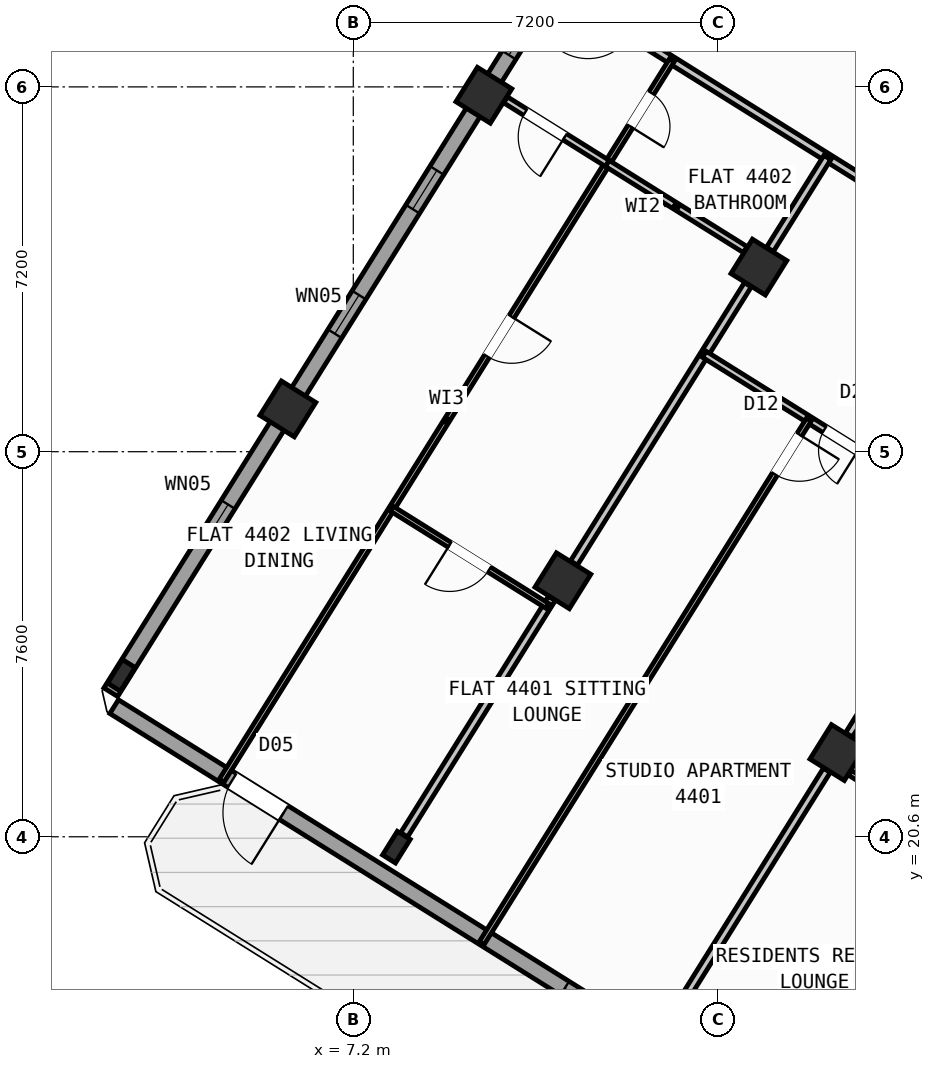
"""IFC4 building model, lengths in metres.
Left out: names, types, materials, properties, quantities, classifications, styles, units other than length and angle.
Written with IfcOpenShell. Run it as: python <this file> out.ifc"""

import sys

from ifc_helpers import new_model, si_unit, direction, frame, frame_2d, origin, origin_2d, place, context, subcontext, project, spatial, rectangle, hollow_rectangle, i_section, extrude, source, transform, mapped, element, fill, save


model = new_model("IFC4")
c1 = context("Model", 3, precision=1e-05, world=origin(), true_north=direction((0.0, 1.0)))
c2 = subcontext(c1, "Body", "Model", "MODEL_VIEW")
j1 = project(units=[si_unit("LENGTHUNIT", "METRE"), si_unit("PLANEANGLEUNIT", "RADIAN")], contexts=[c1])
p1 = place(None, origin())
s1 = spatial("IfcSite", under=j1, at=p1, CompositionType="ELEMENT")
p2 = place(p1, origin())
s2 = spatial("IfcBuilding", under=s1, at=p2, CompositionType="ELEMENT")
p3 = place(p2, frame((0.0, 0.0, 174.9)))
s3 = spatial("IfcBuildingStorey", under=s2, at=p3, CompositionType="ELEMENT", Elevation=174.9)
m1 = source(origin(), c2, "Body", "SweptSolid", [
    extrude(hollow_rectangle(XDim=0.8, YDim=0.8, WallThickness=0.032, at=origin_2d()), origin(), (0.0, 0.0, 1.0), 4.5),
])
for number, where, z_axis, x_axis in (
    (1, (16.764, 22.261, 0.0), (0.0, 0.0, 1.0), (-0.848, 0.53, 0.0)),
    (2, (15.205, 31.844, 0.0), (0.0, 0.0, 1.0), (-0.848, 0.53, 0.0)),
    (3, (11.336, 25.653, 0.0), (0.0, 0.0, 1.0), (-0.848, 0.53, 0.0)),
):
    element("IfcColumn", number, at=place(p3, frame(where, z_axis=z_axis, x_axis=x_axis)), inside=s3, PredefinedType="COLUMN", context=c2, shape_type="MappedRepresentation", body=[
        mapped(m1, transform((0.0, 0.0, 0.0), scale=1.0)),
    ])
m2 = source(origin(), c2, "Body", "SweptSolid", [
    extrude(i_section(OverallWidth=0.3, OverallDepth=0.55, WebThickness=0.015, FlangeThickness=0.029, at=origin_2d()), origin(), (0.0, 0.0, 1.0), 4.5),
])
p4 = place(p3, frame((8.051, 20.395, 0.0), z_axis=(0.0, 0.0, 1.0), x_axis=(-0.848048096156, 0.529919264233, 0.0)))
e4 = element("IfcColumn", 4, at=p4, inside=s3, PredefinedType="COLUMN", context=c2, shape_type="MappedRepresentation", body=[
    mapped(m2, transform((0.0, 0.0, 0.0), scale=1.0)),
])
for number, where, z_axis, x_axis in (
    (5, (9.777, 35.235, 0.0), (0.0, 0.0, 1.0), (-0.848, 0.53, 0.0)),
    (6, (5.909, 29.044, 0.0), (0.0, 0.0, 1.0), (-0.848, 0.53, 0.0)),
):
    element("IfcColumn", number, at=place(p3, frame(where, z_axis=z_axis, x_axis=x_axis)), inside=s3, PredefinedType="COLUMN", context=c2, shape_type="MappedRepresentation", body=[
        mapped(m1, transform((0.0, 0.0, 0.0), scale=1.0)),
    ])
p5 = place(p3, frame((2.623, 23.786, 0.0), z_axis=(0.0, 0.0, 1.0), x_axis=(-0.848048096156, 0.529919264233, 0.0)))
e7 = element("IfcColumn", 7, at=p5, inside=s3, PredefinedType="COLUMN", context=c2, shape_type="MappedRepresentation", body=[
    mapped(m2, transform((0.0, 0.0, 0.0), scale=1.0)),
])
p6 = place(p3, frame((29.268, 6.429, 0.0), z_axis=(0.0, 0.0, 1.0), x_axis=(-0.848049971435, 0.529916263149, 0.0)))
e8 = element("IfcWall", 8, at=p6, inside=s3, PredefinedType="STANDARD", context=c2, shape_type="SweptSolid", body=[
    extrude(rectangle(XDim=31.588, YDim=0.32, at=frame_2d((15.794, 0.0))), origin(), (0.0, 0.0, 1.0), 4.22),
])
p7 = place(p6, frame((27.641, 0.0, 0.0)))
e9 = element("IfcOpeningElement", 9, at=p7, cuts=e8, PredefinedType="OPENING", context=c2, shape_type="SweptSolid", body=[
    extrude(rectangle(XDim=1.2, YDim=2.15, at=frame_2d((0.6, 1.075))), frame((0.0, 0.17, 0.0), z_axis=(0.0, -1.0, 0.0), x_axis=(1.0, 0.0, 0.0)), (0.0, 0.0, 1.0), 0.34),
])
p8 = place(p6, frame((2.954, 0.0, 0.8)))
e10 = element("IfcOpeningElement", 10, at=p8, cuts=e8, PredefinedType="OPENING", context=c2, shape_type="SweptSolid", body=[
    extrude(rectangle(XDim=2.1, YDim=1.55, at=frame_2d((1.05, 0.775))), frame((0.0, 0.17, 0.0), z_axis=(0.0, -1.0, 0.0), x_axis=(1.0, 0.0, 0.0)), (0.0, 0.0, 1.0), 0.34),
])
p9 = place(p6, frame((8.253, 0.0, 0.8)))
e11 = element("IfcOpeningElement", 11, at=p9, cuts=e8, PredefinedType="OPENING", context=c2, shape_type="SweptSolid", body=[
    extrude(rectangle(XDim=2.1, YDim=1.55, at=frame_2d((1.05, 0.775))), frame((0.0, 0.17, 0.0), z_axis=(0.0, -1.0, 0.0), x_axis=(1.0, 0.0, 0.0)), (0.0, 0.0, 1.0), 0.34),
])
p10 = place(p6, frame((20.2, 0.0, 1.0)))
e12 = element("IfcOpeningElement", 12, at=p10, cuts=e8, PredefinedType="OPENING", context=c2, shape_type="SweptSolid", body=[
    extrude(rectangle(XDim=0.9, YDim=1.25, at=frame_2d((0.45, 0.625))), frame((0.0, 0.17, 0.0), z_axis=(0.0, -1.0, 0.0), x_axis=(1.0, 0.0, 0.0)), (0.0, 0.0, 1.0), 0.34),
])
p11 = place(p3, frame((2.415, 23.452, 0.0), z_axis=(0.0, 0.0, 1.0), x_axis=(0.52991049553, 0.848053575387, 0.0)))
e13 = element("IfcWall", 13, at=p11, inside=s3, PredefinedType="STANDARD", context=c2, shape_type="SweptSolid", body=[
    extrude(rectangle(XDim=21.587, YDim=0.32, at=frame_2d((10.794, 0.0))), origin(), (0.0, 0.0, 1.0), 2.395),
])
p12 = place(p11, frame((3.469, 0.0, 1.0)))
e14 = element("IfcOpeningElement", 14, at=p12, cuts=e13, PredefinedType="OPENING", context=c2, shape_type="SweptSolid", body=[
    extrude(rectangle(XDim=0.9, YDim=1.25, at=frame_2d((0.45, 0.625))), frame((0.0, 0.17, 0.0), z_axis=(0.0, -1.0, 0.0), x_axis=(1.0, 0.0, 0.0)), (0.0, 0.0, 1.0), 0.34),
])
p13 = place(p11, frame((8.344, 0.0, 1.0)))
e15 = element("IfcOpeningElement", 15, at=p13, cuts=e13, PredefinedType="OPENING", context=c2, shape_type="SweptSolid", body=[
    extrude(rectangle(XDim=0.9, YDim=1.25, at=frame_2d((0.45, 0.625))), frame((0.0, 0.17, 0.0), z_axis=(0.0, -1.0, 0.0), x_axis=(1.0, 0.0, 0.0)), (0.0, 0.0, 1.0), 0.34),
])
p14 = place(p11, frame((11.244, 0.0, 1.0)))
e16 = element("IfcOpeningElement", 16, at=p14, cuts=e13, PredefinedType="OPENING", context=c2, shape_type="SweptSolid", body=[
    extrude(rectangle(XDim=0.9, YDim=1.25, at=frame_2d((0.45, 0.625))), frame((0.0, 0.17, 0.0), z_axis=(0.0, -1.0, 0.0), x_axis=(1.0, 0.0, 0.0)), (0.0, 0.0, 1.0), 0.34),
])
p15 = place(p11, frame((14.829, 0.0, 1.0)))
e17 = element("IfcOpeningElement", 17, at=p15, cuts=e13, PredefinedType="OPENING", context=c2, shape_type="SweptSolid", body=[
    extrude(rectangle(XDim=0.9, YDim=1.25, at=frame_2d((0.45, 0.625))), frame((0.0, 0.17, 0.0), z_axis=(0.0, -1.0, 0.0), x_axis=(1.0, 0.0, 0.0)), (0.0, 0.0, 1.0), 0.34),
])
p16 = place(p3, frame((14.138, 41.825, 0.0), z_axis=(0.0, 0.0, 1.0), x_axis=(0.848046498049, -0.529921821731, 0.0)))
e18 = element("IfcWall", 18, at=p16, inside=s3, PredefinedType="STANDARD", context=c2, shape_type="SweptSolid", body=[
    extrude(rectangle(XDim=31.588, YDim=0.32, at=frame_2d((15.794, 0.0))), origin(), (0.0, 0.0, 1.0), 4.22),
])
p17 = place(p16, frame((3.339, 0.0, 0.0)))
e19 = element("IfcOpeningElement", 19, at=p17, cuts=e18, PredefinedType="OPENING", context=c2, shape_type="SweptSolid", body=[
    extrude(rectangle(XDim=1.05, YDim=2.15, at=frame_2d((0.525, 1.075))), frame((0.0, 0.17, 0.0), z_axis=(0.0, -1.0, 0.0), x_axis=(1.0, 0.0, 0.0)), (0.0, 0.0, 1.0), 0.34),
])
p18 = place(p16, frame((1.819, 0.0, 1.0)))
e20 = element("IfcOpeningElement", 20, at=p18, cuts=e18, PredefinedType="OPENING", context=c2, shape_type="SweptSolid", body=[
    extrude(rectangle(XDim=0.9, YDim=1.25, at=frame_2d((0.45, 0.625))), frame((0.0, 0.17, 0.0), z_axis=(0.0, -1.0, 0.0), x_axis=(1.0, 0.0, 0.0)), (0.0, 0.0, 1.0), 0.34),
])
p19 = place(p16, frame((8.494, 0.0, 0.85)))
e21 = element("IfcOpeningElement", 21, at=p19, cuts=e18, PredefinedType="OPENING", context=c2, shape_type="SweptSolid", body=[
    extrude(rectangle(XDim=1.8, YDim=1.5, at=frame_2d((0.9, 0.75))), frame((0.0, 0.17, 0.0), z_axis=(0.0, -1.0, 0.0), x_axis=(1.0, 0.0, 0.0)), (0.0, 0.0, 1.0), 0.34),
])
p20 = place(p16, frame((14.636, 0.0, 1.0)))
e22 = element("IfcOpeningElement", 22, at=p20, cuts=e18, PredefinedType="OPENING", context=c2, shape_type="SweptSolid", body=[
    extrude(rectangle(XDim=0.9, YDim=1.25, at=frame_2d((0.45, 0.625))), frame((0.0, 0.17, 0.0), z_axis=(0.0, -1.0, 0.0), x_axis=(1.0, 0.0, 0.0)), (0.0, 0.0, 1.0), 0.34),
])
p21 = place(p16, frame((22.456, 0.0, 0.95)))
e23 = element("IfcOpeningElement", 23, at=p21, cuts=e18, PredefinedType="OPENING", context=c2, shape_type="SweptSolid", body=[
    extrude(rectangle(XDim=1.2, YDim=1.4, at=frame_2d((0.6, 0.7))), frame((0.0, 0.17, 0.0), z_axis=(0.0, -1.0, 0.0), x_axis=(1.0, 0.0, 0.0)), (0.0, 0.0, 1.0), 0.34),
])
p22 = place(p16, frame((27.131, 0.0, 0.95)))
e24 = element("IfcOpeningElement", 24, at=p22, cuts=e18, PredefinedType="OPENING", context=c2, shape_type="SweptSolid", body=[
    extrude(rectangle(XDim=1.2, YDim=1.4, at=frame_2d((0.6, 0.7))), frame((0.0, 0.17, 0.0), z_axis=(0.0, -1.0, 0.0), x_axis=(1.0, 0.0, 0.0)), (0.0, 0.0, 1.0), 0.34),
])
p23 = place(p3, frame((25.198, 28.606, 0.0), z_axis=(0.0, 0.0, 1.0), x_axis=(-0.529921796515, -0.848046513806, 0.0)))
e25 = element("IfcWall", 25, at=p23, inside=s3, PredefinedType="PARTITIONING", context=c2, shape_type="SweptSolid", body=[
    extrude(rectangle(XDim=16.5, YDim=0.16, at=frame_2d((8.25, 0.0))), origin(), (0.0, 0.0, 1.0), 4.21),
])
p24 = place(p3, frame((26.363, 30.472, 0.0), z_axis=(0.0, 0.0, 1.0), x_axis=(-0.848052408131, 0.529912363569, 0.0)))
e26 = element("IfcWall", 26, at=p24, inside=s3, PredefinedType="PARTITIONING", context=c2, shape_type="SweptSolid", body=[
    extrude(rectangle(XDim=16.73, YDim=0.16, at=frame_2d((8.365, 0.0))), origin(), (0.0, 0.0, 1.0), 4.21),
])
p25 = place(p24, frame((1.588, 0.0, 0.0)))
e27 = element("IfcOpeningElement", 27, at=p25, cuts=e26, PredefinedType="OPENING", context=c2, shape_type="SweptSolid", body=[
    extrude(rectangle(XDim=1.0, YDim=2.1, at=frame_2d((0.5, 1.05))), frame((0.0, 0.09, 0.0), z_axis=(0.0, -1.0, 0.0), x_axis=(1.0, 0.0, 0.0)), (0.0, 0.0, 1.0), 0.18),
])
p26 = place(p24, frame((6.685, 0.0, 0.0)))
e28 = element("IfcOpeningElement", 28, at=p26, cuts=e26, PredefinedType="OPENING", context=c2, shape_type="SweptSolid", body=[
    extrude(rectangle(XDim=1.0, YDim=2.1, at=frame_2d((0.5, 1.05))), frame((0.0, 0.09, 0.0), z_axis=(0.0, -1.0, 0.0), x_axis=(1.0, 0.0, 0.0)), (0.0, 0.0, 1.0), 0.18),
])
p27 = place(p24, frame((12.951, 0.0, 0.0)))
e29 = element("IfcOpeningElement", 29, at=p27, cuts=e26, PredefinedType="OPENING", context=c2, shape_type="SweptSolid", body=[
    extrude(rectangle(XDim=1.0, YDim=2.1, at=frame_2d((0.5, 1.05))), frame((0.0, 0.09, 0.0), z_axis=(0.0, -1.0, 0.0), x_axis=(1.0, 0.0, 0.0)), (0.0, 0.0, 1.0), 0.18),
])
p28 = place(p3, frame((25.198, 28.606, 0.0), z_axis=(0.0, 0.0, 1.0), x_axis=(-0.848052408131, 0.529912363569, 0.0)))
e30 = element("IfcWall", 30, at=p28, inside=s3, PredefinedType="PARTITIONING", context=c2, shape_type="SweptSolid", body=[
    extrude(rectangle(XDim=16.73, YDim=0.16, at=frame_2d((8.365, 0.0))), origin(), (0.0, 0.0, 1.0), 4.21),
])
p29 = place(p28, frame((1.395, 0.0, 0.0)))
e31 = element("IfcOpeningElement", 31, at=p29, cuts=e30, PredefinedType="OPENING", context=c2, shape_type="SweptSolid", body=[
    extrude(rectangle(XDim=1.0, YDim=2.1, at=frame_2d((0.5, 1.05))), frame((0.0, 0.09, 0.0), z_axis=(0.0, -1.0, 0.0), x_axis=(1.0, 0.0, 0.0)), (0.0, 0.0, 1.0), 0.18),
])
p30 = place(p28, frame((7.82, 0.0, 0.0)))
e32 = element("IfcOpeningElement", 32, at=p30, cuts=e30, PredefinedType="OPENING", context=c2, shape_type="SweptSolid", body=[
    extrude(rectangle(XDim=1.0, YDim=2.1, at=frame_2d((0.5, 1.05))), frame((0.0, 0.09, 0.0), z_axis=(0.0, -1.0, 0.0), x_axis=(1.0, 0.0, 0.0)), (0.0, 0.0, 1.0), 0.18),
])
p31 = place(p28, frame((14.76, 0.0, 0.0)))
e33 = element("IfcOpeningElement", 33, at=p31, cuts=e30, PredefinedType="OPENING", context=c2, shape_type="SweptSolid", body=[
    extrude(rectangle(XDim=1.0, YDim=2.1, at=frame_2d((0.5, 1.05))), frame((0.0, 0.09, 0.0), z_axis=(0.0, -1.0, 0.0), x_axis=(1.0, 0.0, 0.0)), (0.0, 0.0, 1.0), 0.18),
])
p32 = place(p3, frame((20.414, 28.103, 0.0), z_axis=(0.0, 0.0, 1.0), x_axis=(-0.529934553702, -0.848038542045, 0.0)))
e34 = element("IfcWall", 34, at=p32, inside=s3, PredefinedType="PARTITIONING", context=c2, shape_type="SweptSolid", body=[
    extrude(rectangle(XDim=6.476, YDim=0.16, at=frame_2d((3.238, 0.0))), origin(), (0.0, 0.0, 1.0), 2.395),
])
p33 = place(p3, frame((16.545, 21.912, 0.0), z_axis=(0.0, 0.0, 1.0), x_axis=(-0.52995106774, -0.848028222291, 0.0)))
e35 = element("IfcWall", 35, at=p33, inside=s3, PredefinedType="PARTITIONING", context=c2, shape_type="SweptSolid", body=[
    extrude(rectangle(XDim=5.501, YDim=0.16, at=frame_2d((2.75, 0.0))), origin(), (0.0, 0.0, 1.0), 4.21),
])
p34 = place(p3, frame((19.865, 20.073, 0.0), z_axis=(0.0, 0.0, 1.0), x_axis=(-0.848055143312, 0.529907986259, 0.0)))
e36 = element("IfcWall", 36, at=p34, inside=s3, PredefinedType="PARTITIONING", context=c2, shape_type="SweptSolid", body=[
    extrude(rectangle(XDim=3.378, YDim=0.11, at=frame_2d((1.689, 0.0))), origin(), (0.0, 0.0, 1.0), 2.395),
])
p35 = place(p34, frame((1.435, 0.0, 0.0)))
e37 = element("IfcOpeningElement", 37, at=p35, cuts=e36, PredefinedType="OPENING", context=c2, shape_type="SweptSolid", body=[
    extrude(rectangle(XDim=0.92, YDim=2.08, at=frame_2d((0.46, 1.04))), frame((0.0, 0.065, 0.0), z_axis=(0.0, -1.0, 0.0), x_axis=(1.0, 0.0, 0.0)), (0.0, 0.0, 1.0), 0.13),
])
p36 = place(p3, frame((16.556, 34.006, 0.0), z_axis=(0.0, 0.0, 1.0), x_axis=(-0.529927092104, -0.84804320471, 0.0)))
e38 = element("IfcWall", 38, at=p36, inside=s3, PredefinedType="PARTITIONING", context=c2, shape_type="SweptSolid", body=[
    extrude(rectangle(XDim=2.138, YDim=0.16, at=frame_2d((1.069, 0.0))), origin(), (0.0, 0.0, 1.0), 2.395),
])
p37 = place(p3, frame((14.986, 31.494, 0.0), z_axis=(0.0, 0.0, 1.0), x_axis=(-0.529907440938, -0.848055484057, 0.0)))
e39 = element("IfcWall", 39, at=p37, inside=s3, PredefinedType="PARTITIONING", context=c2, shape_type="SweptSolid", body=[
    extrude(rectangle(XDim=6.476, YDim=0.16, at=frame_2d((3.238, 0.0))), origin(), (0.0, 0.0, 1.0), 2.395),
])
p38 = place(p3, frame((11.118, 25.303, 0.0), z_axis=(0.0, 0.0, 1.0), x_axis=(-0.529919150083, -0.848048167486, 0.0)))
e40 = element("IfcWall", 40, at=p38, inside=s3, PredefinedType="PARTITIONING", context=c2, shape_type="SweptSolid", body=[
    extrude(rectangle(XDim=5.501, YDim=0.16, at=frame_2d((2.75, 0.0))), origin(), (0.0, 0.0, 1.0), 4.21),
])
p39 = place(p3, frame((19.556, 26.73, 0.0), z_axis=(0.0, 0.0, 1.0), x_axis=(-0.848049732085, 0.529916646191, 0.0)))
e41 = element("IfcWall", 41, at=p39, inside=s3, PredefinedType="PLUMBINGWALL", context=c2, shape_type="SweptSolid", body=[
    extrude(rectangle(XDim=6.4, YDim=0.14, at=frame_2d((3.2, 0.0))), origin(), (0.0, 0.0, 1.0), 4.21),
])
p40 = place(p39, frame((2.824, 0.0, 0.0)))
e42 = element("IfcOpeningElement", 42, at=p40, cuts=e41, PredefinedType="OPENING", context=c2, shape_type="SweptSolid", body=[
    extrude(rectangle(XDim=0.78, YDim=2.05, at=frame_2d((0.39, 1.025))), frame((0.0, 0.08, 0.0), z_axis=(0.0, -1.0, 0.0), x_axis=(1.0, 0.0, 0.0)), (0.0, 0.0, 1.0), 0.16),
])
p41 = place(p3, frame((16.191, 28.833, 0.0), z_axis=(0.0, 0.0, 1.0), x_axis=(-0.529921526101, -0.84804668278, 0.0)))
e43 = element("IfcWall", 43, at=p41, inside=s3, PredefinedType="PARTITIONING", context=c2, shape_type="SweptSolid", body=[
    extrude(rectangle(XDim=12.19, YDim=0.11, at=frame_2d((6.095, 0.0))), origin(), (0.0, 0.0, 1.0), 4.21),
])
p42 = place(p41, frame((0.35, 0.0, 0.0)))
e44 = element("IfcOpeningElement", 44, at=p42, cuts=e43, PredefinedType="OPENING", context=c2, shape_type="SweptSolid", body=[
    extrude(rectangle(XDim=0.92, YDim=2.08, at=frame_2d((0.46, 1.04))), frame((0.0, 0.065, 0.0), z_axis=(0.0, -1.0, 0.0), x_axis=(1.0, 0.0, 0.0)), (0.0, 0.0, 1.0), 0.13),
])
p43 = place(p3, frame((13.486, 35.924, 0.0), z_axis=(0.0, 0.0, 1.0), x_axis=(-0.529920421309, -0.848047373134, 0.0)))
e45 = element("IfcWall", 45, at=p43, inside=s3, PredefinedType="PARTITIONING", context=c2, shape_type="SweptSolid", body=[
    extrude(rectangle(XDim=16.77, YDim=0.11, at=frame_2d((8.385, 0.0))), origin(), (0.0, 0.0, 1.0), 4.21),
])
p44 = place(p43, frame((0.76, 0.0, 0.0)))
e46 = element("IfcOpeningElement", 46, at=p44, cuts=e45, PredefinedType="OPENING", context=c2, shape_type="SweptSolid", body=[
    extrude(rectangle(XDim=0.78, YDim=2.05, at=frame_2d((0.39, 1.025))), frame((0.0, 0.065, 0.0), z_axis=(0.0, -1.0, 0.0), x_axis=(1.0, 0.0, 0.0)), (0.0, 0.0, 1.0), 0.13),
])
p45 = place(p43, frame((5.967, 0.0, 0.0)))
e47 = element("IfcOpeningElement", 47, at=p45, cuts=e45, PredefinedType="OPENING", context=c2, shape_type="SweptSolid", body=[
    extrude(rectangle(XDim=0.92, YDim=2.08, at=frame_2d((0.46, 1.04))), frame((0.0, 0.065, 0.0), z_axis=(0.0, -1.0, 0.0), x_axis=(1.0, 0.0, 0.0)), (0.0, 0.0, 1.0), 0.13),
])
p46 = place(p3, frame((12.214, 33.889, 0.0), z_axis=(0.0, 0.0, 1.0), x_axis=(-0.848056217259, 0.529906267531, 0.0)))
e48 = element("IfcWall", 48, at=p46, inside=s3, PredefinedType="PLUMBINGWALL", context=c2, shape_type="SweptSolid", body=[
    extrude(rectangle(XDim=2.368, YDim=0.14, at=frame_2d((1.184, 0.0))), origin(), (0.0, 0.0, 1.0), 3.695),
])
p47 = place(p46, frame((0.99, 0.0, 0.0)))
e49 = element("IfcOpeningElement", 49, at=p47, cuts=e48, PredefinedType="OPENING", context=c2, shape_type="SweptSolid", body=[
    extrude(rectangle(XDim=0.92, YDim=2.08, at=frame_2d((0.46, 1.04))), frame((0.0, 0.08, 0.0), z_axis=(0.0, -1.0, 0.0), x_axis=(1.0, 0.0, 0.0)), (0.0, 0.0, 1.0), 0.16),
])
p48 = place(p3, frame((14.935, 32.189, 0.0), z_axis=(0.0, 0.0, 1.0), x_axis=(-0.848045332252, 0.529923687379, 0.0)))
e50 = element("IfcWall", 50, at=p48, inside=s3, PredefinedType="PLUMBINGWALL", context=c2, shape_type="SweptSolid", body=[
    extrude(rectangle(XDim=3.208, YDim=0.14, at=frame_2d((1.604, 0.0))), origin(), (0.0, 0.0, 1.0), 3.695),
])
p49 = place(p3, frame((11.027, 25.158, 0.0), z_axis=(0.0, 0.0, 1.0), x_axis=(-0.848051346257, 0.52991406295, 0.0)))
e51 = element("IfcWall", 51, at=p49, inside=s3, PredefinedType="PARTITIONING", context=c2, shape_type="SweptSolid", body=[
    extrude(rectangle(XDim=3.62, YDim=0.11, at=frame_2d((1.81, 0.0))), origin(), (0.0, 0.0, 1.0), 4.21),
])
p50 = place(p49, frame((1.35, 0.0, 0.0)))
e52 = element("IfcOpeningElement", 52, at=p50, cuts=e51, PredefinedType="OPENING", context=c2, shape_type="SweptSolid", body=[
    extrude(rectangle(XDim=0.92, YDim=2.08, at=frame_2d((0.46, 1.04))), frame((0.0, 0.065, 0.0), z_axis=(0.0, -1.0, 0.0), x_axis=(1.0, 0.0, 0.0)), (0.0, 0.0, 1.0), 0.13),
])
m3 = source(origin(), c2, "Body", "SweptSolid", [
    extrude(rectangle(XDim=1.2, YDim=2.15, at=frame_2d((0.6, 1.075))), frame((0.0, 0.025, 0.0), z_axis=(0.0, -1.0, 0.0), x_axis=(1.0, 0.0, 0.0)), (0.0, 0.0, 1.0), 0.05),
])
p51 = place(p7, origin())
e53 = element("IfcDoor", 53, at=p51, inside=s3, OperationType="SINGLE_SWING_LEFT", PredefinedType="DOOR", context=c2, shape_type="MappedRepresentation", body=[
    mapped(m3, transform((0.0, 0.0, 0.0), scale=1.0)),
])
fill(e9, e53)
m4 = source(origin(), c2, "Body", "SweptSolid", [
    extrude(rectangle(XDim=0.9, YDim=1.25, at=frame_2d((0.45, 0.625))), frame((0.0, 0.03, 0.0), z_axis=(0.0, -1.0, 0.0), x_axis=(1.0, 0.0, 0.0)), (0.0, 0.0, 1.0), 0.06),
])
p52 = place(p12, origin())
e54 = element("IfcWindow", 54, at=p52, inside=s3, PartitioningType="SINGLE_PANEL", PredefinedType="WINDOW", context=c2, shape_type="MappedRepresentation", body=[
    mapped(m4, transform((0.0, 0.0, 0.0), scale=1.0)),
])
fill(e14, e54)
p53 = place(p13, origin())
e55 = element("IfcWindow", 55, at=p53, inside=s3, PartitioningType="SINGLE_PANEL", PredefinedType="WINDOW", context=c2, shape_type="MappedRepresentation", body=[
    mapped(m4, transform((0.0, 0.0, 0.0), scale=1.0)),
])
fill(e15, e55)
p54 = place(p14, origin())
e56 = element("IfcWindow", 56, at=p54, inside=s3, PartitioningType="SINGLE_PANEL", PredefinedType="WINDOW", context=c2, shape_type="MappedRepresentation", body=[
    mapped(m4, transform((0.0, 0.0, 0.0), scale=1.0)),
])
fill(e16, e56)
p55 = place(p15, origin())
e57 = element("IfcWindow", 57, at=p55, inside=s3, PartitioningType="SINGLE_PANEL", PredefinedType="WINDOW", context=c2, shape_type="MappedRepresentation", body=[
    mapped(m4, transform((0.0, 0.0, 0.0), scale=1.0)),
])
fill(e17, e57)
p56 = place(p10, origin())
e58 = element("IfcWindow", 58, at=p56, inside=s3, PartitioningType="SINGLE_PANEL", PredefinedType="WINDOW", context=c2, shape_type="MappedRepresentation", body=[
    mapped(m4, transform((0.0, 0.0, 0.0), scale=1.0)),
])
fill(e12, e58)
m5 = source(origin(), c2, "Body", "SweptSolid", [
    extrude(rectangle(XDim=0.92, YDim=2.08, at=frame_2d((0.46, 1.04))), frame((0.0, 0.025, 0.0), z_axis=(0.0, -1.0, 0.0), x_axis=(1.0, 0.0, 0.0)), (0.0, 0.0, 1.0), 0.05),
])
p57 = place(p42, origin())
e59 = element("IfcDoor", 59, at=p57, inside=s3, OperationType="SINGLE_SWING_LEFT", PredefinedType="DOOR", context=c2, shape_type="MappedRepresentation", body=[
    mapped(m5, transform((0.0, 0.0, 0.0), scale=1.0)),
])
fill(e44, e59)
m6 = source(origin(), c2, "Body", "SweptSolid", [
    extrude(rectangle(XDim=0.78, YDim=2.05, at=frame_2d((0.39, 1.025))), frame((0.0, 0.025, 0.0), z_axis=(0.0, -1.0, 0.0), x_axis=(1.0, 0.0, 0.0)), (0.0, 0.0, 1.0), 0.05),
])
p58 = place(p40, origin())
e60 = element("IfcDoor", 60, at=p58, inside=s3, OperationType="SINGLE_SWING_LEFT", PredefinedType="DOOR", context=c2, shape_type="MappedRepresentation", body=[
    mapped(m6, transform((0.0, 0.0, 0.0), scale=1.0)),
])
fill(e42, e60)
p59 = place(p47, origin())
e61 = element("IfcDoor", 61, at=p59, inside=s3, OperationType="SINGLE_SWING_LEFT", PredefinedType="DOOR", context=c2, shape_type="MappedRepresentation", body=[
    mapped(m5, transform((0.0, 0.0, 0.0), scale=1.0)),
])
fill(e49, e61)
p60 = place(p44, origin())
e62 = element("IfcDoor", 62, at=p60, inside=s3, OperationType="SINGLE_SWING_RIGHT", PredefinedType="DOOR", context=c2, shape_type="MappedRepresentation", body=[
    mapped(m6, transform((0.0, 0.0, 0.0), scale=1.0)),
])
fill(e46, e62)
p61 = place(p45, origin())
e63 = element("IfcDoor", 63, at=p61, inside=s3, OperationType="SINGLE_SWING_LEFT", PredefinedType="DOOR", context=c2, shape_type="MappedRepresentation", body=[
    mapped(m5, transform((0.0, 0.0, 0.0), scale=1.0)),
])
fill(e47, e63)
p62 = place(p50, origin())
e64 = element("IfcDoor", 64, at=p62, inside=s3, OperationType="SINGLE_SWING_RIGHT", PredefinedType="DOOR", context=c2, shape_type="MappedRepresentation", body=[
    mapped(m5, transform((0.0, 0.0, 0.0), scale=1.0)),
])
fill(e52, e64)
save(model, sys.argv[1])
